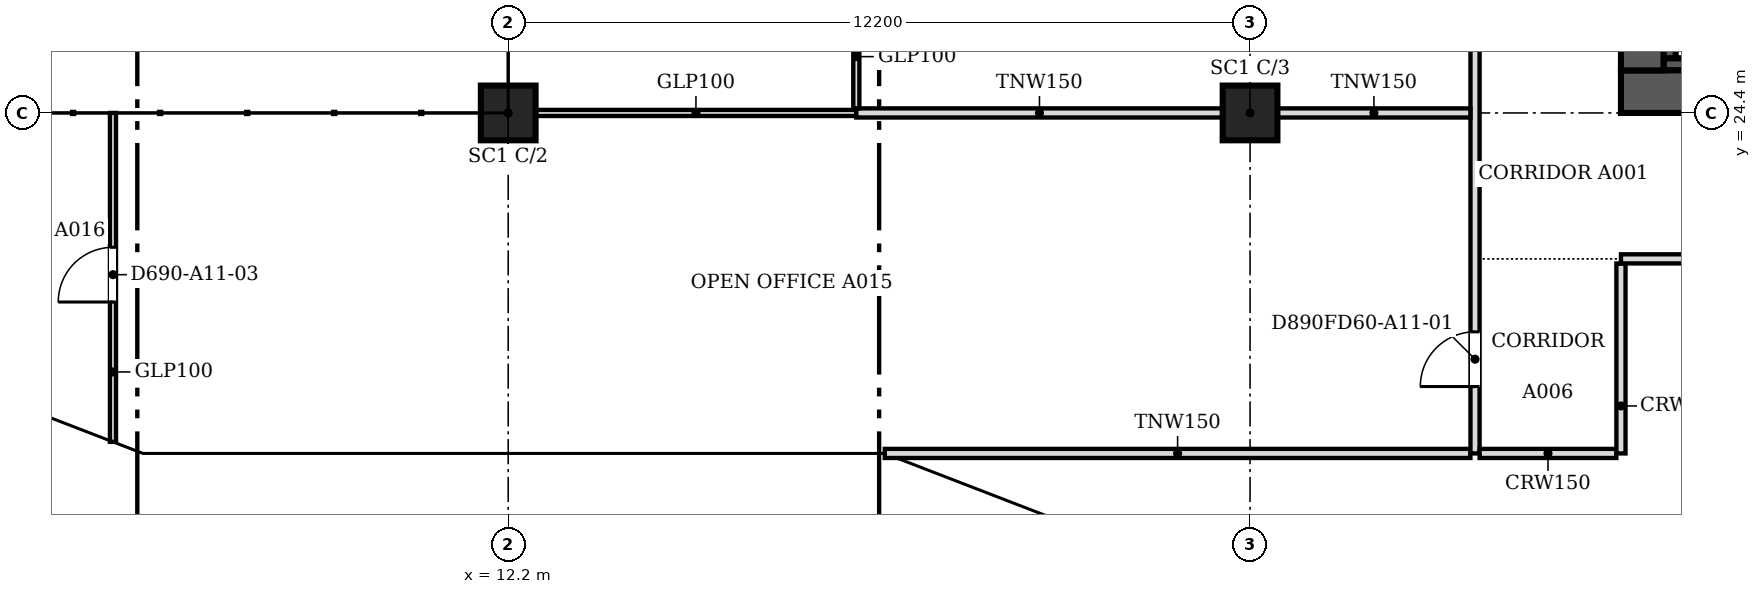
"""IFC4 building model, lengths in metres.
Left out: names, types, materials, properties, quantities, classifications, styles, units other than length and angle.
Written with IfcOpenShell. Run it as: python <this file> out.ifc"""

import sys

from ifc_helpers import new_model, si_unit, direction, frame, frame_2d, origin, origin_2d, place, context, subcontext, project, spatial, polyline, rectangle, outline, extrude, faceted_brep, source, transform, mapped, element, fill, save


model = new_model("IFC4")
c1 = context("Model", 3, precision=1e-05, world=origin(), true_north=direction((0.0, 1.0)))
c2 = subcontext(c1, "Body", "Model", "MODEL_VIEW")
j1 = project(units=[si_unit("LENGTHUNIT", "METRE"), si_unit("PLANEANGLEUNIT", "RADIAN")], contexts=[c1])
p1 = place(None, origin())
s1 = spatial("IfcSite", under=j1, at=p1, CompositionType="ELEMENT")
p2 = place(p1, origin())
s2 = spatial("IfcBuilding", under=s1, at=p2, CompositionType="ELEMENT")
p3 = place(p2, frame((0.0, 0.0, 124.0)))
s3 = spatial("IfcBuildingStorey", under=s2, at=p3, CompositionType="ELEMENT", Elevation=124.0)
for number, where, z_axis, x_axis in (
    (1, (12.2, 24.4, 0.0), (0.0, 0.0, 1.0), (1.0, 0.0, 0.0)),
    (2, (24.4, 24.4, 0.0), (0.0, 0.0, 1.0), (1.0, 0.0, 0.0)),
):
    element("IfcColumn", number, at=place(p3, frame(where, z_axis=z_axis, x_axis=x_axis)), inside=s3, PredefinedType="COLUMN", context=c2, shape_type="SweptSolid", body=[
        extrude(rectangle(XDim=0.9, YDim=0.9, at=origin_2d()), origin(), (0.0, 0.0, 1.0), 3.6),
    ])
m1 = source(origin(), c2, "Body", "Brep", [
    faceted_brep([(0.053, -0.25, 0.0), (3.003, -0.25, 3.8), (0.053, -0.25, 7.6), (0.0, -0.25, 7.532), (0.0, -0.25, 0.068), (0.106, 0.25, 7.532), (2.957, 0.25, 3.86), (2.957, 0.25, 3.74), (0.106, 0.25, 0.068), (3.003, 0.0, 3.8), (0.053, 0.0, 0.0), (0.053, 0.0, 7.6)], [[[0, 1, 2, 3, 4]], [[5, 6, 7, 8]], [[8, 7, 9, 1, 0, 10]], [[6, 5, 11, 2, 1, 9]], [[3, 2, 11]], [[10, 0, 4]], [[8, 10, 4, 3, 11, 5]], [[9, 7, 6]]]),
])
p4 = place(p3, frame((3.344, 19.631, -3.8), z_axis=(0.0, 0.0, 1.0), x_axis=(0.933007896601, -0.359855894603, 0.0)))
e3 = element("IfcWall", 3, at=p4, inside=s3, PredefinedType="SOLIDWALL", context=c2, shape_type="MappedRepresentation", body=[
    mapped(m1, transform((0.0, 0.0, 0.0), scale=1.0)),
])
m2 = source(origin(), c2, "Body", "SweptSolid", [
    extrude(outline(polyline([(0.253, 0.665), (2.687, 3.8), (0.253, 6.935), (0.253, 0.665)])), frame((0.0, 0.26, 0.0), z_axis=(0.0, -1.0, 0.0), x_axis=(1.0, 0.0, 0.0)), (0.0, 0.0, 1.0), 0.52),
])
p5 = place(p4, origin())
e4 = element("IfcOpeningElement", 4, at=p5, cuts=e3, PredefinedType="OPENING", context=c2, shape_type="MappedRepresentation", body=[
    mapped(m2, transform((0.0, 0.0, 0.0), scale=1.0)),
])
m3 = source(origin(), c2, "Body", "Brep", [
    faceted_brep([(3.003, -0.25, 0.0), (6.053, -0.25, 3.8), (3.003, -0.25, 7.6), (0.0, -0.25, 3.8), (0.047, 0.25, 3.859), (3.003, 0.25, 7.6), (6.053, 0.25, 3.8), (3.003, 0.25, 0.0), (0.047, 0.25, 3.741), (0.0, 0.0, 3.8)], [[[0, 1, 2, 3]], [[4, 5, 6, 7, 8]], [[7, 6, 1, 0]], [[6, 5, 2, 1]], [[5, 4, 9, 3, 2]], [[8, 7, 0, 3, 9]], [[8, 9, 4]]]),
])
p6 = place(p3, frame((6.146, 18.55, -3.8), z_axis=(0.0, 0.0, 1.0), x_axis=(1.0, 0.0, 0.0)))
e5 = element("IfcWall", 5, at=p6, inside=s3, PredefinedType="SOLIDWALL", context=c2, shape_type="MappedRepresentation", body=[
    mapped(m3, transform((0.0, 0.0, 0.0), scale=1.0)),
])
m4 = source(origin(), c2, "Body", "SweptSolid", [
    extrude(outline(polyline([(3.005, 0.401), (5.733, 3.8), (3.005, 7.199), (0.319, 3.8), (3.005, 0.401)])), frame((0.0, 0.26, 0.0), z_axis=(0.0, -1.0, 0.0), x_axis=(1.0, 0.0, 0.0)), (0.0, 0.0, 1.0), 0.52),
])
p7 = place(p6, origin())
e6 = element("IfcOpeningElement", 6, at=p7, cuts=e5, PredefinedType="OPENING", context=c2, shape_type="MappedRepresentation", body=[
    mapped(m4, transform((0.0, 0.0, 0.0), scale=1.0)),
])
m5 = source(origin(), c2, "Body", "Brep", [
    faceted_brep([(3.05, -0.25, 0.0), (6.1, -0.25, 3.743), (6.1, -0.25, 3.857), (3.05, -0.25, 7.6), (0.0, -0.25, 3.8), (0.0, 0.25, 3.8), (3.05, 0.25, 7.6), (6.146, 0.25, 3.8), (3.05, 0.25, 0.0), (6.146, -0.0, 3.8)], [[[0, 1, 2, 3, 4]], [[5, 6, 7, 8]], [[8, 7, 9, 1, 0]], [[7, 6, 3, 2, 9]], [[6, 5, 4, 3]], [[5, 8, 0, 4]], [[1, 9, 2]]]),
])
p8 = place(p3, frame((12.2, 18.55, -3.8), z_axis=(0.0, 0.0, 1.0), x_axis=(1.0, 0.0, 0.0)))
e7 = element("IfcWall", 7, at=p8, inside=s3, PredefinedType="SOLIDWALL", context=c2, shape_type="MappedRepresentation", body=[
    mapped(m5, transform((0.0, 0.0, 0.0), scale=1.0)),
])
m6 = source(origin(), c2, "Body", "SweptSolid", [
    extrude(outline(polyline([(3.052, 0.398), (5.824, 3.8), (3.052, 7.202), (0.321, 3.8), (3.052, 0.398)])), frame((0.0, 0.26, 0.0), z_axis=(0.0, -1.0, 0.0), x_axis=(1.0, 0.0, 0.0)), (0.0, 0.0, 1.0), 0.52),
])
p9 = place(p8, origin())
e8 = element("IfcOpeningElement", 8, at=p9, cuts=e7, PredefinedType="OPENING", context=c2, shape_type="MappedRepresentation", body=[
    mapped(m6, transform((0.0, 0.0, 0.0), scale=1.0)),
])
m7 = source(origin(), c2, "Body", "Brep", [
    faceted_brep([(3.096, -0.25, 7.536), (0.047, -0.25, 3.856), (0.047, -0.25, 3.744), (3.096, -0.25, 0.064), (0.0, 0.25, 3.8), (3.149, 0.25, 7.6), (3.202, 0.25, 7.536), (3.202, 0.25, 0.064), (3.149, 0.25, 0.0), (3.149, -0.0, 0.0), (3.149, -0.0, 7.6), (0.0, 0.0, 3.8)], [[[0, 1, 2, 3]], [[4, 5, 6, 7, 8]], [[8, 7, 9]], [[6, 5, 10]], [[5, 4, 11, 1, 0, 10]], [[4, 8, 9, 3, 2, 11]], [[11, 2, 1]], [[3, 9, 7, 6, 10, 0]]]),
])
p10 = place(p3, frame((18.346, 18.55, -3.8), z_axis=(0.0, 0.0, 1.0), x_axis=(0.932985567668, -0.359913782069, 0.0)))
e9 = element("IfcWall", 9, at=p10, inside=s3, PredefinedType="SOLIDWALL", context=c2, shape_type="MappedRepresentation", body=[
    mapped(m7, transform((0.0, 0.0, 0.0), scale=1.0)),
])
m8 = source(origin(), c2, "Body", "SweptSolid", [
    extrude(outline(polyline([(2.949, 6.967), (0.325, 3.8), (2.949, 0.633), (2.949, 6.967)])), frame((0.0, 0.26, 0.0), z_axis=(0.0, -1.0, 0.0), x_axis=(1.0, 0.0, 0.0)), (0.0, 0.0, 1.0), 0.52),
])
p11 = place(p10, origin())
e10 = element("IfcOpeningElement", 10, at=p11, cuts=e9, PredefinedType="OPENING", context=c2, shape_type="MappedRepresentation", body=[
    mapped(m8, transform((0.0, 0.0, 0.0), scale=1.0)),
])
p12 = place(p2, frame((0.0, 0.0, 127.8)))
s4 = spatial("IfcBuildingStorey", under=s2, at=p12, CompositionType="ELEMENT", Elevation=127.8)
m9 = source(origin(), c2, "Body", "Brep", [
    faceted_brep([(2.95, -0.25, 0.0), (2.997, -0.25, 0.059), (2.997, -0.25, 7.541), (2.95, -0.25, 7.6), (0.0, -0.25, 3.8), (0.053, 0.25, 3.868), (2.904, 0.25, 7.54), (2.904, 0.25, 0.06), (0.053, 0.25, 3.732), (2.95, 0.0, 0.0), (2.95, 0.0, 7.6), (0.0, 0.0, 3.8)], [[[0, 1, 2, 3, 4]], [[5, 6, 7, 8]], [[1, 0, 9]], [[10, 3, 2]], [[6, 5, 11, 4, 3, 10]], [[8, 7, 9, 0, 4, 11]], [[8, 11, 5]], [[1, 9, 7, 6, 10, 2]]]),
])
p13 = place(p12, frame((3.394, 19.612, -3.8), z_axis=(0.0, 0.0, 1.0), x_axis=(0.932990326376, -0.359901446078, 0.0)))
e11 = element("IfcWall", 11, at=p13, inside=s4, PredefinedType="SOLIDWALL", context=c2, shape_type="MappedRepresentation", body=[
    mapped(m9, transform((0.0, 0.0, 0.0), scale=1.0)),
])
m10 = source(origin(), c2, "Body", "SweptSolid", [
    extrude(outline(polyline([(2.75, 6.935), (0.316, 3.8), (2.75, 0.665), (2.75, 6.935)])), frame((0.0, 0.26, 0.0), z_axis=(0.0, -1.0, 0.0), x_axis=(1.0, 0.0, 0.0)), (0.0, 0.0, 1.0), 0.52),
])
p14 = place(p13, origin())
e12 = element("IfcOpeningElement", 12, at=p14, cuts=e11, PredefinedType="OPENING", context=c2, shape_type="MappedRepresentation", body=[
    mapped(m10, transform((0.0, 0.0, 0.0), scale=1.0)),
])
m11 = source(origin(), c2, "Body", "Brep", [
    faceted_brep([(0.047, -0.25, 0.0), (3.05, -0.25, 3.8), (0.047, -0.25, 7.6), (0.0, -0.25, 7.54), (0.0, -0.25, 0.06), (0.093, 0.25, 7.541), (3.05, 0.25, 3.8), (0.093, 0.25, 0.059), (0.047, 0.0, 0.0), (0.047, 0.0, 7.6)], [[[0, 1, 2, 3, 4]], [[5, 6, 7]], [[7, 6, 1, 0, 8]], [[6, 5, 9, 2, 1]], [[3, 2, 9]], [[8, 0, 4]], [[7, 8, 4, 3, 9, 5]]]),
])
p15 = place(p12, frame((6.1, 18.55, -3.8), z_axis=(0.0, 0.0, 1.0), x_axis=(1.0, 0.0, 0.0)))
e13 = element("IfcWall", 13, at=p15, inside=s4, PredefinedType="SOLIDWALL", context=c2, shape_type="MappedRepresentation", body=[
    mapped(m11, transform((0.0, 0.0, 0.0), scale=1.0)),
])
m12 = source(origin(), c2, "Body", "SweptSolid", [
    extrude(outline(polyline([(0.247, 0.656), (2.731, 3.8), (0.247, 6.944), (0.247, 0.656)])), frame((0.0, 0.26, 0.0), z_axis=(0.0, -1.0, 0.0), x_axis=(1.0, 0.0, 0.0)), (0.0, 0.0, 1.0), 0.52),
])
p16 = place(p15, origin())
e14 = element("IfcOpeningElement", 14, at=p16, cuts=e13, PredefinedType="OPENING", context=c2, shape_type="MappedRepresentation", body=[
    mapped(m12, transform((0.0, 0.0, 0.0), scale=1.0)),
])
m13 = source(origin(), c2, "Body", "SweptSolid", [
    extrude(outline(polyline([(3.05, 0.0), (6.1, 3.8), (3.05, 7.6), (0.0, 3.8), (3.05, 0.0)])), frame((0.0, 0.25, 0.0), z_axis=(0.0, -1.0, 0.0), x_axis=(1.0, 0.0, 0.0)), (0.0, 0.0, 1.0), 0.5),
])
p17 = place(p12, frame((9.15, 18.55, -3.8), z_axis=(0.0, 0.0, 1.0), x_axis=(1.0, 0.0, 0.0)))
e15 = element("IfcWall", 15, at=p17, inside=s4, PredefinedType="SOLIDWALL", context=c2, shape_type="MappedRepresentation", body=[
    mapped(m13, transform((0.0, 0.0, 0.0), scale=1.0)),
])
m14 = source(origin(), c2, "Body", "SweptSolid", [
    extrude(outline(polyline([(3.05, 0.399), (5.78, 3.8), (3.05, 7.201), (0.321, 3.8), (3.05, 0.399)])), frame((0.0, 0.26, 0.0), z_axis=(0.0, -1.0, 0.0), x_axis=(1.0, 0.0, 0.0)), (0.0, 0.0, 1.0), 0.52),
])
p18 = place(p17, origin())
e16 = element("IfcOpeningElement", 16, at=p18, cuts=e15, PredefinedType="OPENING", context=c2, shape_type="MappedRepresentation", body=[
    mapped(m14, transform((0.0, 0.0, 0.0), scale=1.0)),
])
m15 = source(origin(), c2, "Body", "Brep", [
    faceted_brep([(3.05, -0.25, 7.543), (0.0, -0.25, 3.8), (3.05, -0.25, 0.057), (0.0, 0.25, 3.8), (3.096, 0.25, 7.6), (3.143, 0.25, 7.544), (3.143, 0.25, 0.056), (3.096, 0.25, 0.0), (3.096, -0.0, 0.0), (3.096, -0.0, 7.6)], [[[0, 1, 2]], [[3, 4, 5, 6, 7]], [[7, 6, 8]], [[5, 4, 9]], [[4, 3, 1, 0, 9]], [[3, 7, 8, 2, 1]], [[2, 8, 6, 5, 9, 0]]]),
])
p19 = place(p12, frame((15.25, 18.55, -3.8), z_axis=(0.0, 0.0, 1.0), x_axis=(1.0, 0.0, 0.0)))
e17 = element("IfcWall", 17, at=p19, inside=s4, PredefinedType="SOLIDWALL", context=c2, shape_type="MappedRepresentation", body=[
    mapped(m15, transform((0.0, 0.0, 0.0), scale=1.0)),
])
m16 = source(origin(), c2, "Body", "SweptSolid", [
    extrude(outline(polyline([(2.896, 6.959), (0.323, 3.8), (2.896, 0.641), (2.896, 6.959)])), frame((0.0, 0.26, 0.0), z_axis=(0.0, -1.0, 0.0), x_axis=(1.0, 0.0, 0.0)), (0.0, 0.0, 1.0), 0.52),
])
p20 = place(p19, origin())
e18 = element("IfcOpeningElement", 18, at=p20, cuts=e17, PredefinedType="OPENING", context=c2, shape_type="MappedRepresentation", body=[
    mapped(m16, transform((0.0, 0.0, 0.0), scale=1.0)),
])
m17 = source(origin(), c2, "Body", "Brep", [
    faceted_brep([(0.093, -0.25, 0.056), (3.143, -0.25, 3.736), (3.143, -0.25, 3.864), (0.093, -0.25, 7.544), (0.0, 0.25, 7.543), (0.047, 0.25, 7.6), (3.196, 0.25, 3.8), (0.047, 0.25, 0.0), (0.0, 0.25, 0.057), (3.196, -0.0, 3.8), (0.047, 0.0, 0.0), (0.047, 0.0, 7.6)], [[[0, 1, 2, 3]], [[4, 5, 6, 7, 8]], [[7, 6, 9, 1, 0, 10]], [[6, 5, 11, 3, 2, 9]], [[5, 4, 11]], [[8, 7, 10]], [[8, 10, 0, 3, 11, 4]], [[1, 9, 2]]]),
])
p21 = place(p12, frame((18.303, 18.567, -3.8), z_axis=(0.0, 0.0, 1.0), x_axis=(0.932978940178, -0.359930961693, 0.0)))
e19 = element("IfcWall", 19, at=p21, inside=s4, PredefinedType="SOLIDWALL", context=c2, shape_type="MappedRepresentation", body=[
    mapped(m17, transform((0.0, 0.0, 0.0), scale=1.0)),
])
m18 = source(origin(), c2, "Body", "SweptSolid", [
    extrude(outline(polyline([(0.247, 0.633), (2.871, 3.8), (0.247, 6.967), (0.247, 0.633)])), frame((0.0, 0.26, 0.0), z_axis=(0.0, -1.0, 0.0), x_axis=(1.0, 0.0, 0.0)), (0.0, 0.0, 1.0), 0.52),
])
p22 = place(p21, origin())
e20 = element("IfcOpeningElement", 20, at=p22, cuts=e19, PredefinedType="OPENING", context=c2, shape_type="MappedRepresentation", body=[
    mapped(m18, transform((0.0, 0.0, 0.0), scale=1.0)),
])
p23 = place(p3, frame((54.9, 24.75, 0.0), z_axis=(0.0, 0.0, 1.0), x_axis=(-1.0, 0.0, 0.0)))
e21 = element("IfcWall", 21, at=p23, inside=s3, PredefinedType="SHEAR", context=c2, shape_type="SweptSolid", body=[
    extrude(rectangle(XDim=24.4, YDim=0.7, at=frame_2d((12.2, 0.0))), origin(), (0.0, 0.0, 1.0), 3.8),
])
m19 = source(origin(), c2, "Body", "SweptSolid", [
    extrude(rectangle(XDim=1.2, YDim=2.1, at=frame_2d((0.6, 1.05))), frame((0.0, 0.36, 0.0), z_axis=(0.0, -1.0, 0.0), x_axis=(1.0, 0.0, 0.0)), (0.0, 0.0, 1.0), 0.72),
])
p24 = place(p23, frame((1.5, 0.0, 0.0)))
e22 = element("IfcOpeningElement", 22, at=p24, cuts=e21, PredefinedType="OPENING", context=c2, shape_type="MappedRepresentation", body=[
    mapped(m19, transform((0.0, 0.0, 0.0), scale=1.0)),
])
p25 = place(p3, frame((30.85, 25.1, 0.0), z_axis=(0.0, 0.0, 1.0), x_axis=(0.0, 1.0, 0.0)))
e23 = element("IfcWall", 23, at=p25, inside=s3, PredefinedType="SHEAR", context=c2, shape_type="SweptSolid", body=[
    extrude(rectangle(XDim=23.0, YDim=0.7, at=frame_2d((11.5, 0.0))), origin(), (0.0, 0.0, 1.0), 3.8),
])
m20 = source(origin(), c2, "Body", "SweptSolid", [
    extrude(rectangle(XDim=2.1, YDim=2.4, at=frame_2d((1.05, 1.2))), frame((0.0, 0.36, 0.0), z_axis=(0.0, -1.0, 0.0), x_axis=(1.0, 0.0, 0.0)), (0.0, 0.0, 1.0), 0.72),
])
p26 = place(p25, frame((4.7, 0.0, 0.0)))
e24 = element("IfcOpeningElement", 24, at=p26, cuts=e23, PredefinedType="OPENING", context=c2, shape_type="MappedRepresentation", body=[
    mapped(m20, transform((0.0, 0.0, 0.0), scale=1.0)),
])
p27 = place(p25, frame((16.2, 0.0, 0.0)))
e25 = element("IfcOpeningElement", 25, at=p27, cuts=e23, PredefinedType="OPENING", context=c2, shape_type="MappedRepresentation", body=[
    mapped(m20, transform((0.0, 0.0, 0.0), scale=1.0)),
])
p28 = place(p3, frame((31.2, 25.2, 0.0), z_axis=(0.0, 0.0, 1.0), x_axis=(1.0, 0.0, 0.0)))
e26 = element("IfcWall", 26, at=p28, inside=s3, PredefinedType="SOLIDWALL", context=c2, shape_type="SweptSolid", body=[
    extrude(rectangle(XDim=21.0, YDim=0.2, at=frame_2d((10.5, 0.0))), origin(), (0.0, 0.0, 1.0), 3.8),
])
p29 = place(p3, frame((31.3, 25.3, 0.0), z_axis=(0.0, 0.0, 1.0), x_axis=(0.0, 1.0, 0.0)))
e27 = element("IfcWall", 27, at=p29, inside=s3, PredefinedType="SOLIDWALL", context=c2, shape_type="SweptSolid", body=[
    extrude(rectangle(XDim=4.5, YDim=0.2, at=frame_2d((2.25, 0.0))), origin(), (0.0, 0.0, 1.0), 3.8),
])
p30 = place(p3, frame((18.393, 18.8, 0.0), z_axis=(0.0, 0.0, 1.0), x_axis=(1.0, 0.0, 0.0)))
e28 = element("IfcWall", 28, at=p30, inside=s3, PredefinedType="PARTITIONING", context=c2, shape_type="SweptSolid", body=[
    extrude(rectangle(XDim=9.631, YDim=0.15, at=frame_2d((4.815, 0.0))), origin(), (0.0, 0.0, 1.0), 3.067),
])
p31 = place(p3, frame((28.1, 18.8, 0.0), z_axis=(0.0, 0.0, 1.0), x_axis=(0.0, 1.0, 0.0)))
e29 = element("IfcWall", 29, at=p31, inside=s3, PredefinedType="PARTITIONING", context=c2, shape_type="SweptSolid", body=[
    extrude(rectangle(XDim=26.5, YDim=0.15, at=frame_2d((13.25, 0.0))), origin(), (0.0, 0.0, 1.0), 3.067),
])
m21 = source(origin(), c2, "Body", "SweptSolid", [
    extrude(rectangle(XDim=0.9, YDim=2.1, at=frame_2d((0.45, 1.05))), frame((0.0, 0.085, 0.0), z_axis=(0.0, -1.0, 0.0), x_axis=(1.0, 0.0, 0.0)), (0.0, 0.0, 1.0), 0.17),
])
p32 = place(p31, frame((1.1, 0.0, 0.0)))
e30 = element("IfcOpeningElement", 30, at=p32, cuts=e29, PredefinedType="OPENING", context=c2, shape_type="MappedRepresentation", body=[
    mapped(m21, transform((0.0, 0.0, 0.0), scale=1.0)),
])
p33 = place(p31, frame((9.7, 0.0, 0.0)))
e31 = element("IfcOpeningElement", 31, at=p33, cuts=e29, PredefinedType="OPENING", context=c2, shape_type="MappedRepresentation", body=[
    mapped(m21, transform((0.0, 0.0, 0.0), scale=1.0)),
])
p34 = place(p31, frame((20.15, 0.0, 0.0)))
e32 = element("IfcOpeningElement", 32, at=p34, cuts=e29, PredefinedType="OPENING", context=c2, shape_type="MappedRepresentation", body=[
    mapped(m21, transform((0.0, 0.0, 0.0), scale=1.0)),
])
p35 = place(p3, frame((28.176, 18.8, 0.0), z_axis=(0.0, 0.0, 1.0), x_axis=(1.0, 0.0, 0.0)))
e33 = element("IfcWall", 33, at=p35, inside=s3, PredefinedType="PARTITIONING", context=c2, shape_type="SweptSolid", body=[
    extrude(rectangle(XDim=2.248, YDim=0.15, at=frame_2d((1.124, 0.0))), origin(), (0.0, 0.0, 1.0), 3.067),
])
p36 = place(p3, frame((30.5, 18.8, 0.0), z_axis=(0.0, 0.0, 1.0), x_axis=(0.0, 1.0, 0.0)))
e34 = element("IfcWall", 34, at=p36, inside=s3, PredefinedType="PARTITIONING", context=c2, shape_type="SweptSolid", body=[
    extrude(rectangle(XDim=3.124, YDim=0.15, at=frame_2d((1.562, 0.0))), origin(), (0.0, 0.0, 1.0), 3.067),
])
p37 = place(p3, frame((5.7, 18.99, 0.0), z_axis=(0.0, 0.0, 1.0), x_axis=(0.0, 1.0, 0.0)))
e35 = element("IfcWall", 35, at=p37, inside=s3, PredefinedType="PARTITIONING", context=c2, shape_type="SweptSolid", body=[
    extrude(rectangle(XDim=5.41, YDim=0.1, at=frame_2d((2.705, 0.0))), origin(), (0.0, 0.0, 1.0), 3.067),
])
m22 = source(origin(), c2, "Body", "SweptSolid", [
    extrude(rectangle(XDim=0.9, YDim=2.1, at=frame_2d((0.45, 1.05))), frame((0.0, 0.06, 0.0), z_axis=(0.0, -1.0, 0.0), x_axis=(1.0, 0.0, 0.0)), (0.0, 0.0, 1.0), 0.12),
])
p38 = place(p37, frame((2.3, 0.0, 0.0)))
e36 = element("IfcOpeningElement", 36, at=p38, cuts=e35, PredefinedType="OPENING", context=c2, shape_type="MappedRepresentation", body=[
    mapped(m22, transform((0.0, 0.0, 0.0), scale=1.0)),
])
p39 = place(p3, frame((30.5, 22.0, 0.0), z_axis=(0.0, 0.0, 1.0), x_axis=(1.0, 0.0, 0.0)))
e37 = element("IfcWall", 37, at=p39, inside=s3, PredefinedType="PARTITIONING", context=c2, shape_type="SweptSolid", body=[
    extrude(rectangle(XDim=12.5, YDim=0.15, at=frame_2d((6.25, 0.0))), origin(), (0.0, 0.0, 1.0), 3.067),
])
p40 = place(p3, frame((12.651, 24.4, 0.0), z_axis=(0.0, 0.0, 1.0), x_axis=(1.0, 0.0, 0.0)))
e38 = element("IfcWall", 38, at=p40, inside=s3, PredefinedType="PARTITIONING", context=c2, shape_type="SweptSolid", body=[
    extrude(rectangle(XDim=5.273, YDim=0.1, at=frame_2d((2.637, 0.0))), origin(), (0.0, 0.0, 1.0), 3.067),
])
p41 = place(p3, frame((17.925, 24.4, 0.0), z_axis=(0.0, 0.0, 1.0), x_axis=(1.0, 0.0, 0.0)))
e39 = element("IfcWall", 39, at=p41, inside=s3, PredefinedType="PARTITIONING", context=c2, shape_type="SweptSolid", body=[
    extrude(rectangle(XDim=6.024, YDim=0.15, at=frame_2d((3.012, 0.0))), origin(), (0.0, 0.0, 1.0), 3.067),
])
p42 = place(p3, frame((24.851, 24.4, 0.0), z_axis=(0.0, 0.0, 1.0), x_axis=(1.0, 0.0, 0.0)))
e40 = element("IfcWall", 40, at=p42, inside=s3, PredefinedType="PARTITIONING", context=c2, shape_type="SweptSolid", body=[
    extrude(rectangle(XDim=3.173, YDim=0.15, at=frame_2d((1.586, 0.0))), origin(), (0.0, 0.0, 1.0), 3.067),
])
p43 = place(p3, frame((17.925, 24.476, 0.0), z_axis=(0.0, 0.0, 1.0), x_axis=(0.0, 1.0, 0.0)))
e41 = element("IfcWall", 41, at=p43, inside=s3, PredefinedType="PARTITIONING", context=c2, shape_type="SweptSolid", body=[
    extrude(rectangle(XDim=4.293, YDim=0.1, at=frame_2d((2.146, 0.0))), origin(), (0.0, 0.0, 1.0), 3.067),
])
p44 = place(p43, frame((1.7, 0.0, 0.0)))
e42 = element("IfcOpeningElement", 42, at=p44, cuts=e41, PredefinedType="OPENING", context=c2, shape_type="MappedRepresentation", body=[
    mapped(m22, transform((0.0, 0.0, 0.0), scale=1.0)),
])
m23 = source(origin(), c2, "Body", "SweptSolid", [
    extrude(rectangle(XDim=0.9, YDim=2.1, at=frame_2d((0.45, 1.05))), frame((0.0, 0.025, 0.0), z_axis=(0.0, -1.0, 0.0), x_axis=(1.0, 0.0, 0.0)), (0.0, 0.0, 1.0), 0.05),
])
p45 = place(p32, origin())
e43 = element("IfcDoor", 43, at=p45, inside=s3, OperationType="SINGLE_SWING_LEFT", PredefinedType="DOOR", context=c2, shape_type="MappedRepresentation", body=[
    mapped(m23, transform((0.0, 0.0, 0.0), scale=1.0)),
])
fill(e30, e43)
p46 = place(p38, origin())
e44 = element("IfcDoor", 44, at=p46, inside=s3, OperationType="SINGLE_SWING_LEFT", PredefinedType="DOOR", context=c2, shape_type="MappedRepresentation", body=[
    mapped(m23, transform((0.0, 0.0, 0.0), scale=1.0)),
])
fill(e36, e44)
save(model, sys.argv[1])
